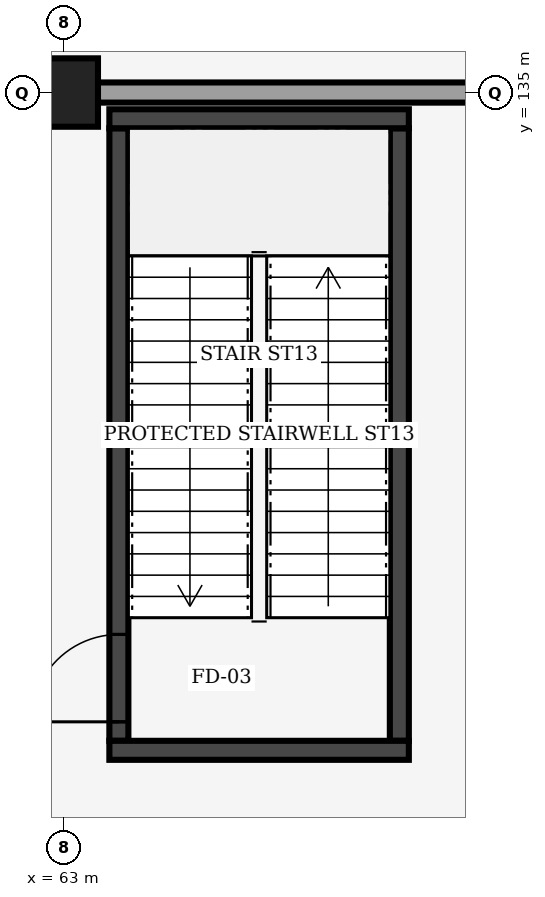
"""IFC4 building model, lengths in metres.
Left out: names, types, materials, properties, quantities, classifications, styles, units other than length and angle.
Written with IfcOpenShell. Run it as: python <this file> out.ifc"""

import sys

from ifc_helpers import new_model, si_unit, direction, frame, frame_2d, origin, origin_2d, place, context, subcontext, project, spatial, rectangle, extrude, element, fill, save


model = new_model("IFC4")
c1 = context("Model", 3, precision=1e-05, world=origin(), true_north=direction((0.0, 1.0)))
c2 = subcontext(c1, "Body", "Model", "MODEL_VIEW")
j1 = project(units=[si_unit("LENGTHUNIT", "METRE"), si_unit("PLANEANGLEUNIT", "RADIAN")], contexts=[c1])
p1 = place(None, origin())
s1 = spatial("IfcSite", under=j1, at=p1, CompositionType="ELEMENT")
p2 = place(p1, origin())
s2 = spatial("IfcBuilding", under=s1, at=p2, CompositionType="ELEMENT")
p3 = place(p2, origin())
s3 = spatial("IfcBuildingStorey", under=s2, at=p3, CompositionType="ELEMENT", Elevation=0.0)
p4 = place(p3, frame((63.0, 135.0, 0.0), z_axis=(0.0, 0.0, 1.0), x_axis=(1.0, 0.0, 0.0)))
e1 = element("IfcColumn", 1, at=p4, inside=s3, PredefinedType="COLUMN", context=c2, shape_type="SweptSolid", body=[
    extrude(rectangle(XDim=0.9, YDim=0.9, at=origin_2d()), origin(), (0.0, 0.0, 1.0), 6.0),
])
p5 = place(p3, frame((63.445, 135.0, 0.0), z_axis=(0.0, 0.0, 1.0), x_axis=(1.0, 0.0, 0.0)))
e2 = element("IfcWall", 2, at=p5, inside=s3, PredefinedType="SOLIDWALL", context=c2, shape_type="SweptSolid", body=[
    extrude(rectangle(XDim=8.408, YDim=0.265, at=frame_2d((4.204, 0.0))), origin(), (0.0, 0.0, 1.0), 4.95),
])
p6 = place(p3, frame((63.725, 126.47, 0.0), z_axis=(0.0, 0.0, 1.0), x_axis=(0.0, 1.0, 0.0)))
e3 = element("IfcWall", 3, at=p6, inside=s3, PredefinedType="SHEAR", context=c2, shape_type="SweptSolid", body=[
    extrude(rectangle(XDim=8.06, YDim=0.25, at=frame_2d((4.03, 0.0))), origin(), (0.0, 0.0, 1.0), 5.72),
])
p7 = place(p6, frame((0.25, 0.0, 0.0)))
e4 = element("IfcOpeningElement", 4, at=p7, cuts=e3, PredefinedType="OPENING", context=c2, shape_type="SweptSolid", body=[
    extrude(rectangle(XDim=1.15, YDim=2.15, at=frame_2d((0.575, 1.075))), frame((0.0, 0.135, 0.0), z_axis=(0.0, -1.0, 0.0), x_axis=(1.0, 0.0, 0.0)), (0.0, 0.0, 1.0), 0.27),
])
p8 = place(p3, frame((67.415, 126.47, 0.0), z_axis=(0.0, 0.0, 1.0), x_axis=(0.0, 1.0, 0.0)))
e5 = element("IfcWall", 5, at=p8, inside=s3, PredefinedType="SHEAR", context=c2, shape_type="SweptSolid", body=[
    extrude(rectangle(XDim=8.06, YDim=0.25, at=frame_2d((4.03, 0.0))), origin(), (0.0, 0.0, 1.0), 5.72),
])
for number, where, z_axis, x_axis in (
    (6, (63.6, 126.345, 0.0), (0.0, 0.0, 1.0), (1.0, 0.0, 0.0)),
    (7, (63.6, 134.655, 0.0), (0.0, 0.0, 1.0), (1.0, 0.0, 0.0)),
):
    element("IfcWall", number, at=place(p3, frame(where, z_axis=z_axis, x_axis=x_axis)), inside=s3, PredefinedType="SHEAR", context=c2, shape_type="SweptSolid", body=[
        extrude(rectangle(XDim=3.94, YDim=0.25, at=frame_2d((1.97, 0.0))), origin(), (0.0, 0.0, 1.0), 5.72),
    ])
p9 = place(p7, origin())
e8 = element("IfcDoor", 8, at=p9, inside=s3, OperationType="SINGLE_SWING_LEFT", PredefinedType="DOOR", context=c2, shape_type="SweptSolid", body=[
    extrude(rectangle(XDim=1.15, YDim=2.15, at=frame_2d((0.575, 1.075))), frame((0.0, 0.025, 0.0), z_axis=(0.0, -1.0, 0.0), x_axis=(1.0, 0.0, 0.0)), (0.0, 0.0, 1.0), 0.05),
])
fill(e4, e8)
save(model, sys.argv[1])
